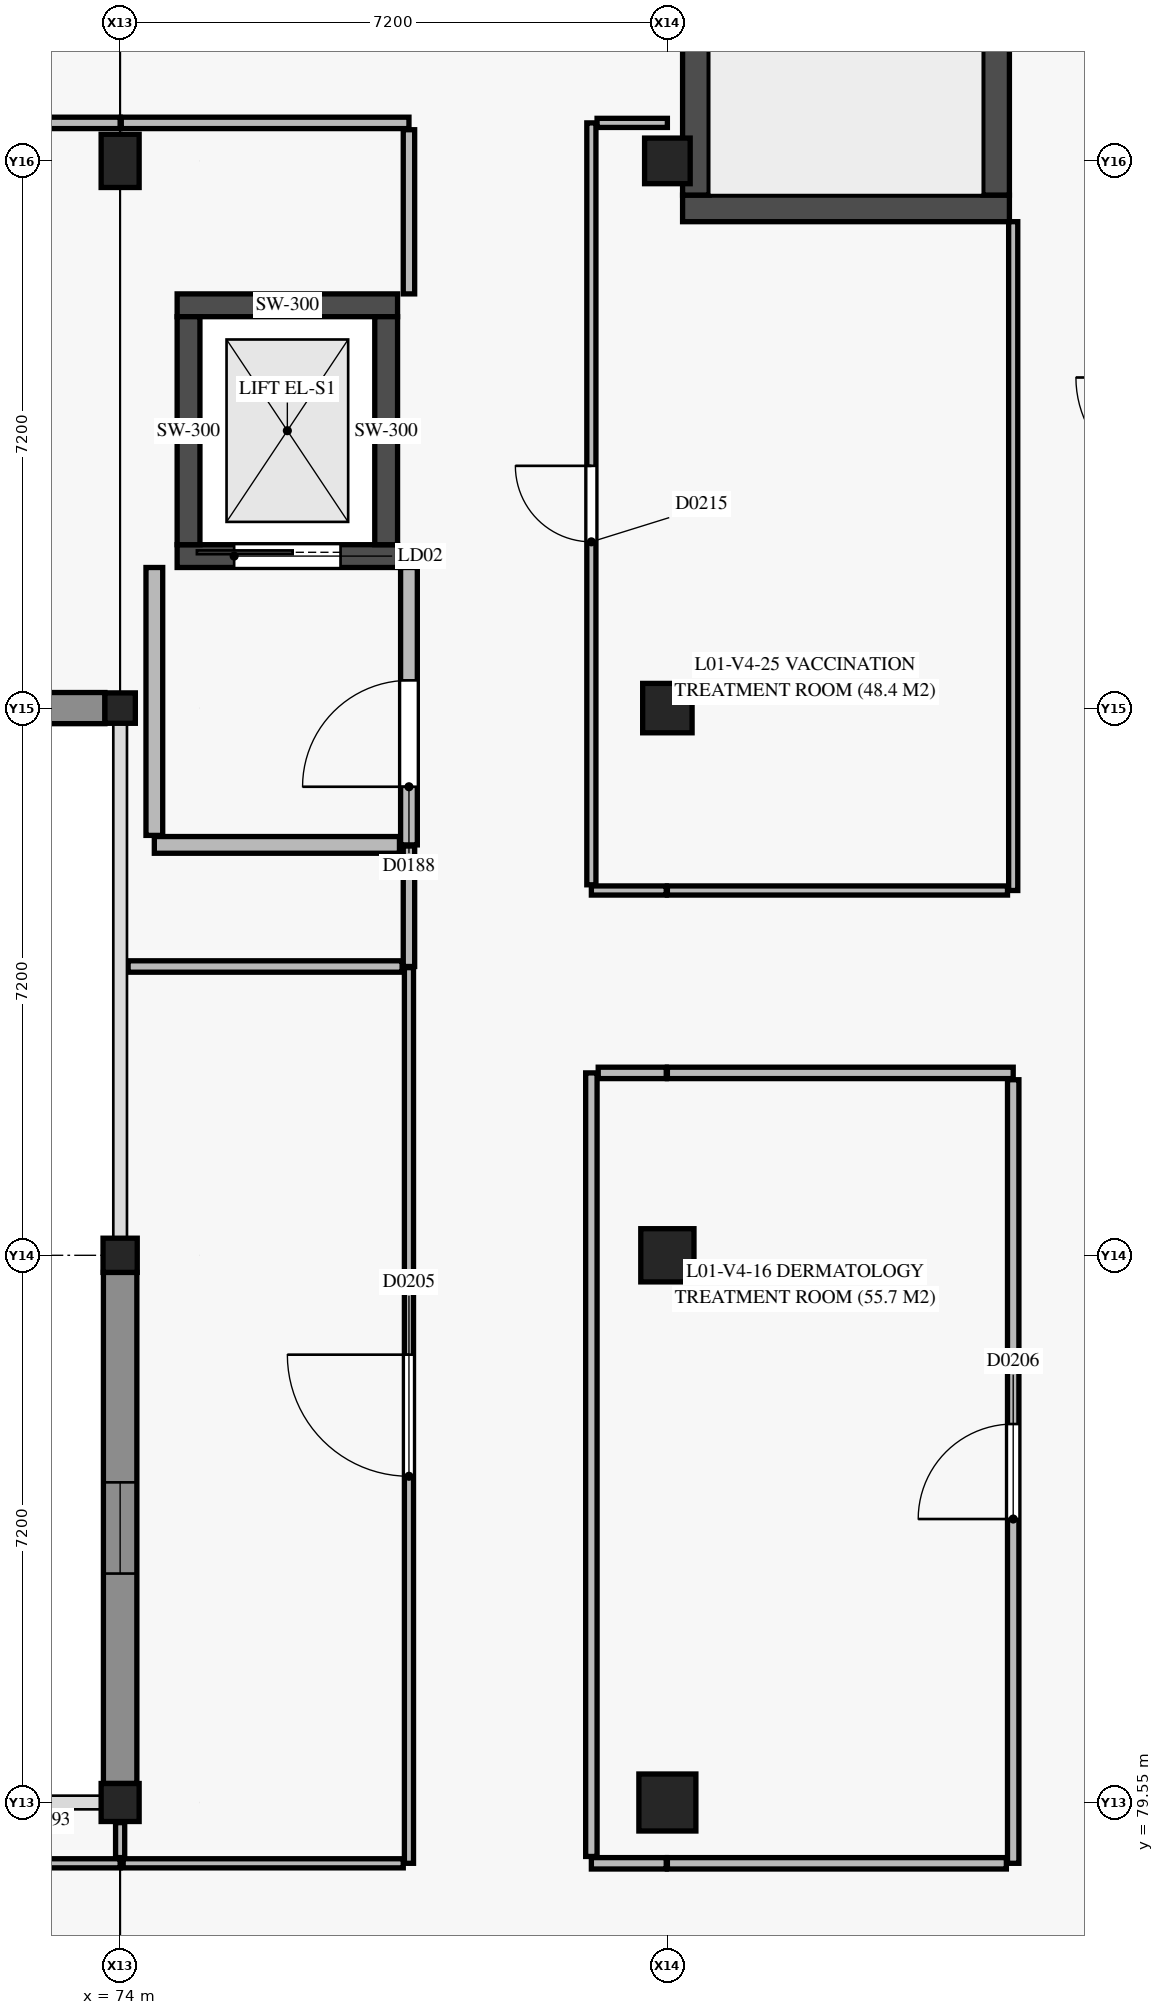
"""IFC4 building model, lengths in metres.
Left out: names, types, materials, properties, quantities, classifications, styles, units other than length and angle.
Written with IfcOpenShell. Run it as: python <this file> out.ifc"""

import sys

from ifc_helpers import new_model, si_unit, direction, frame, frame_2d, origin, origin_2d, place, context, subcontext, project, spatial, rectangle, extrude, element, fill, save


model = new_model("IFC4")
c1 = context("Model", 3, precision=1e-05, world=origin(), true_north=direction((0.0, 1.0)))
c2 = subcontext(c1, "Body", "Model", "MODEL_VIEW")
j1 = project(units=[si_unit("LENGTHUNIT", "METRE"), si_unit("PLANEANGLEUNIT", "RADIAN")], contexts=[c1])
p1 = place(None, origin())
s1 = spatial("IfcSite", under=j1, at=p1, CompositionType="ELEMENT")
p2 = place(p1, origin())
s2 = spatial("IfcBuilding", under=s1, at=p2, CompositionType="ELEMENT")
p3 = place(p2, frame((0.0, 0.0, 4.8)))
s3 = spatial("IfcBuildingStorey", under=s2, at=p3, CompositionType="ELEMENT", Elevation=4.8)
p4 = place(p3, frame((74.0, 79.55, 0.0), z_axis=(0.0, 0.0, 1.0), x_axis=(1.0, 0.0, 0.0)))
e1 = element("IfcColumn", 1, at=p4, inside=s3, PredefinedType="COLUMN", context=c2, shape_type="SweptSolid", body=[
    extrude(rectangle(XDim=0.5, YDim=0.5, at=origin_2d()), origin(), (0.0, 0.0, 1.0), 4.2),
])
p5 = place(p3, frame((74.0, 86.75, 0.0), z_axis=(0.0, 0.0, 1.0), x_axis=(1.0, 0.0, 0.0)))
e2 = element("IfcColumn", 2, at=p5, inside=s3, PredefinedType="COLUMN", context=c2, shape_type="SweptSolid", body=[
    extrude(rectangle(XDim=0.45, YDim=0.45, at=origin_2d()), origin(), (0.0, 0.0, 1.0), 4.2),
])
p6 = place(p3, frame((74.0, 93.95, 0.0), z_axis=(0.0, 0.0, 1.0), x_axis=(1.0, 0.0, 0.0)))
e3 = element("IfcColumn", 3, at=p6, inside=s3, PredefinedType="COLUMN", context=c2, shape_type="SweptSolid", body=[
    extrude(rectangle(XDim=0.4, YDim=0.4, at=origin_2d()), origin(), (0.0, 0.0, 1.0), 4.2),
])
p7 = place(p3, frame((74.0, 101.15, 0.0), z_axis=(0.0, 0.0, 1.0), x_axis=(1.0, 0.0, 0.0)))
e4 = element("IfcColumn", 4, at=p7, inside=s3, PredefinedType="COLUMN", context=c2, shape_type="SweptSolid", body=[
    extrude(rectangle(XDim=0.5, YDim=0.7, at=origin_2d()), origin(), (0.0, 0.0, 1.0), 4.2),
])
p8 = place(p3, frame((81.2, 79.55, 0.0), z_axis=(0.0, 0.0, 1.0), x_axis=(1.0, 0.0, 0.0)))
e5 = element("IfcColumn", 5, at=p8, inside=s3, PredefinedType="COLUMN", context=c2, shape_type="SweptSolid", body=[
    extrude(rectangle(XDim=0.75, YDim=0.75, at=origin_2d()), origin(), (0.0, 0.0, 1.0), 4.2),
])
p9 = place(p3, frame((81.2, 86.75, 0.0), z_axis=(0.0, 0.0, 1.0), x_axis=(1.0, 0.0, 0.0)))
e6 = element("IfcColumn", 6, at=p9, inside=s3, PredefinedType="COLUMN", context=c2, shape_type="SweptSolid", body=[
    extrude(rectangle(XDim=0.7, YDim=0.7, at=origin_2d()), origin(), (0.0, 0.0, 1.0), 4.2),
])
p10 = place(p3, frame((81.2, 93.95, 0.0), z_axis=(0.0, 0.0, 1.0), x_axis=(1.0, 0.0, 0.0)))
e7 = element("IfcColumn", 7, at=p10, inside=s3, PredefinedType="COLUMN", context=c2, shape_type="SweptSolid", body=[
    extrude(rectangle(XDim=0.65, YDim=0.65, at=origin_2d()), origin(), (0.0, 0.0, 1.0), 4.2),
])
p11 = place(p3, frame((81.2, 101.15, 0.0), z_axis=(0.0, 0.0, 1.0), x_axis=(1.0, 0.0, 0.0)))
e8 = element("IfcColumn", 8, at=p11, inside=s3, PredefinedType="COLUMN", context=c2, shape_type="SweptSolid", body=[
    extrude(rectangle(XDim=0.6, YDim=0.6, at=origin_2d()), origin(), (0.0, 0.0, 1.0), 4.2),
])
p12 = place(p3, frame((81.4, 100.525, 0.0), z_axis=(0.0, 0.0, 1.0), x_axis=(1.0, 0.0, 0.0)))
e9 = element("IfcWall", 9, at=p12, inside=s3, PredefinedType="SHEAR", context=c2, shape_type="SweptSolid", body=[
    extrude(rectangle(XDim=4.3, YDim=0.35, at=frame_2d((2.15, 0.0))), origin(), (0.0, 0.0, 1.0), 3.95),
])
p13 = place(p3, frame((81.575, 100.7, 0.0), z_axis=(0.0, 0.0, 1.0), x_axis=(0.0, 1.0, 0.0)))
e10 = element("IfcWall", 10, at=p13, inside=s3, PredefinedType="SHEAR", context=c2, shape_type="SweptSolid", body=[
    extrude(rectangle(XDim=7.3, YDim=0.35, at=frame_2d((3.65, 0.0))), origin(), (0.0, 0.0, 1.0), 3.95),
])
p14 = place(p3, frame((85.525, 100.7, 0.0), z_axis=(0.0, 0.0, 1.0), x_axis=(0.0, 1.0, 0.0)))
e11 = element("IfcWall", 11, at=p14, inside=s3, PredefinedType="SHEAR", context=c2, shape_type="SweptSolid", body=[
    extrude(rectangle(XDim=7.3, YDim=0.35, at=frame_2d((3.65, 0.0))), origin(), (0.0, 0.0, 1.0), 3.95),
])
p15 = place(p14, frame((5.68, 0.0, 0.0)))
e12 = element("IfcOpeningElement", 12, at=p15, cuts=e11, PredefinedType="OPENING", context=c2, shape_type="SweptSolid", body=[
    extrude(rectangle(XDim=1.5, YDim=2.15, at=frame_2d((0.75, 1.075))), frame((0.0, 0.185, 0.0), z_axis=(0.0, -1.0, 0.0), x_axis=(1.0, 0.0, 0.0)), (0.0, 0.0, 1.0), 0.37),
])
p16 = place(p3, frame((74.75, 95.95, 0.0), z_axis=(0.0, 0.0, 1.0), x_axis=(1.0, 0.0, 0.0)))
e13 = element("IfcWall", 13, at=p16, inside=s3, PredefinedType="SHEAR", context=c2, shape_type="SweptSolid", body=[
    extrude(rectangle(XDim=2.9, YDim=0.3, at=frame_2d((1.45, 0.0))), origin(), (0.0, 0.0, 1.0), 3.95),
])
p17 = place(p16, frame((0.75, 0.0, 0.0)))
e14 = element("IfcOpeningElement", 14, at=p17, cuts=e13, PredefinedType="OPENING", context=c2, shape_type="SweptSolid", body=[
    extrude(rectangle(XDim=1.4, YDim=2.15, at=frame_2d((0.7, 1.075))), frame((0.0, 0.16, 0.0), z_axis=(0.0, -1.0, 0.0), x_axis=(1.0, 0.0, 0.0)), (0.0, 0.0, 1.0), 0.32),
])
p18 = place(p3, frame((74.75, 99.25, 0.0), z_axis=(0.0, 0.0, 1.0), x_axis=(1.0, 0.0, 0.0)))
e15 = element("IfcWall", 15, at=p18, inside=s3, PredefinedType="SHEAR", context=c2, shape_type="SweptSolid", body=[
    extrude(rectangle(XDim=2.9, YDim=0.3, at=frame_2d((1.45, 0.0))), origin(), (0.0, 0.0, 1.0), 3.95),
])
for number, where, z_axis, x_axis in (
    (16, (74.9, 96.1, 0.0), (0.0, 0.0, 1.0), (0.0, 1.0, 0.0)),
    (17, (77.5, 96.1, 0.0), (0.0, 0.0, 1.0), (0.0, 1.0, 0.0)),
):
    element("IfcWall", number, at=place(p3, frame(where, z_axis=z_axis, x_axis=x_axis)), inside=s3, PredefinedType="SHEAR", context=c2, shape_type="SweptSolid", body=[
        extrude(rectangle(XDim=3.0, YDim=0.3, at=frame_2d((1.5, 0.0))), origin(), (0.0, 0.0, 1.0), 3.95),
    ])
p19 = place(p3, frame((74.0, 79.8, 0.0), z_axis=(0.0, 0.0, 1.0), x_axis=(0.0, 1.0, 0.0)))
e18 = element("IfcWall", 18, at=p19, inside=s3, PredefinedType="USERDEFINED", context=c2, shape_type="SweptSolid", body=[
    extrude(rectangle(XDim=6.725, YDim=0.44, at=frame_2d((3.362, 0.0))), origin(), (0.0, 0.0, 1.0), 3.13),
])
p20 = place(p19, frame((2.762, 0.0, 0.9)))
e19 = element("IfcOpeningElement", 19, at=p20, cuts=e18, PredefinedType="OPENING", context=c2, shape_type="SweptSolid", body=[
    extrude(rectangle(XDim=1.2, YDim=1.5, at=frame_2d((0.6, 0.75))), frame((0.0, 0.23, 0.0), z_axis=(0.0, -1.0, 0.0), x_axis=(1.0, 0.0, 0.0)), (0.0, 0.0, 1.0), 0.46),
])
p21 = place(p3, frame((73.8, 93.95, 0.0), z_axis=(0.0, 0.0, 1.0), x_axis=(-1.0, 0.0, 0.0)))
e20 = element("IfcWall", 20, at=p21, inside=s3, PredefinedType="USERDEFINED", context=c2, shape_type="SweptSolid", body=[
    extrude(rectangle(XDim=6.625, YDim=0.41, at=frame_2d((3.312, 0.0))), origin(), (0.0, 0.0, 1.0), 3.13),
])
p22 = place(p21, frame((0.84, 0.0, 0.6)))
e21 = element("IfcOpeningElement", 21, at=p22, cuts=e20, PredefinedType="OPENING", context=c2, shape_type="SweptSolid", body=[
    extrude(rectangle(XDim=1.2, YDim=2.2, at=frame_2d((0.6, 1.1))), frame((0.0, 0.215, 0.0), z_axis=(0.0, -1.0, 0.0), x_axis=(1.0, 0.0, 0.0)), (0.0, 0.0, 1.0), 0.43),
])
p23 = place(p21, frame((3.972, 0.0, 0.6)))
e22 = element("IfcOpeningElement", 22, at=p23, cuts=e20, PredefinedType="OPENING", context=c2, shape_type="SweptSolid", body=[
    extrude(rectangle(XDim=1.6, YDim=2.2, at=frame_2d((0.8, 1.1))), frame((0.0, 0.215, 0.0), z_axis=(0.0, -1.0, 0.0), x_axis=(1.0, 0.0, 0.0)), (0.0, 0.0, 1.0), 0.43),
])
p24 = place(p3, frame((77.8, 92.15, 0.0), z_axis=(0.0, 0.0, 1.0), x_axis=(0.0, 1.0, 0.0)))
e23 = element("IfcWall", 23, at=p24, inside=s3, PredefinedType="PARTITIONING", context=c2, shape_type="SweptSolid", body=[
    extrude(rectangle(XDim=3.65, YDim=0.22, at=frame_2d((1.825, 0.0))), origin(), (0.0, 0.0, 1.0), 3.285),
])
p25 = place(p24, frame((0.765, 0.0, 0.0)))
e24 = element("IfcOpeningElement", 24, at=p25, cuts=e23, PredefinedType="OPENING", context=c2, shape_type="SweptSolid", body=[
    extrude(rectangle(XDim=1.4, YDim=2.2, at=frame_2d((0.7, 1.1))), frame((0.0, 0.12, 0.0), z_axis=(0.0, -1.0, 0.0), x_axis=(1.0, 0.0, 0.0)), (0.0, 0.0, 1.0), 0.24),
])
p26 = place(p3, frame((74.45, 92.15, 0.0), z_axis=(0.0, 0.0, 1.0), x_axis=(1.0, 0.0, 0.0)))
e25 = element("IfcWall", 25, at=p26, inside=s3, PredefinedType="PARTITIONING", context=c2, shape_type="SweptSolid", body=[
    extrude(rectangle(XDim=3.225, YDim=0.22, at=frame_2d((1.613, 0.0))), origin(), (0.0, 0.0, 1.0), 3.95),
])
p27 = place(p3, frame((74.45, 92.275, 0.0), z_axis=(0.0, 0.0, 1.0), x_axis=(0.0, 1.0, 0.0)))
e26 = element("IfcWall", 26, at=p27, inside=s3, PredefinedType="PARTITIONING", context=c2, shape_type="SweptSolid", body=[
    extrude(rectangle(XDim=3.525, YDim=0.22, at=frame_2d((1.763, 0.0))), origin(), (0.0, 0.0, 1.0), 3.285),
])
p28 = place(p3, frame((81.2, 89.15, 0.0), z_axis=(0.0, 0.0, 1.0), x_axis=(1.0, 0.0, 0.0)))
e27 = element("IfcWall", 27, at=p28, inside=s3, PredefinedType="PARTITIONING", context=c2, shape_type="SweptSolid", body=[
    extrude(rectangle(XDim=4.55, YDim=0.15, at=frame_2d((2.275, 0.0))), origin(), (0.0, 0.0, 1.0), 3.415),
])
p29 = place(p3, frame((85.75, 78.75, 0.0), z_axis=(0.0, 0.0, 1.0), x_axis=(0.0, 1.0, 0.0)))
e28 = element("IfcWall", 28, at=p29, inside=s3, PredefinedType="PARTITIONING", context=c2, shape_type="SweptSolid", body=[
    extrude(rectangle(XDim=10.31, YDim=0.15, at=frame_2d((5.155, 0.0))), origin(), (0.0, 0.0, 1.0), 3.285),
])
p30 = place(p29, frame((4.53, 0.0, 0.0)))
e29 = element("IfcOpeningElement", 29, at=p30, cuts=e28, PredefinedType="OPENING", context=c2, shape_type="SweptSolid", body=[
    extrude(rectangle(XDim=1.25, YDim=2.15, at=frame_2d((0.625, 1.075))), frame((0.0, 0.085, 0.0), z_axis=(0.0, -1.0, 0.0), x_axis=(1.0, 0.0, 0.0)), (0.0, 0.0, 1.0), 0.17),
])
p31 = place(p3, frame((81.2, 78.75, 0.0), z_axis=(0.0, 0.0, 1.0), x_axis=(1.0, 0.0, 0.0)))
e30 = element("IfcWall", 30, at=p31, inside=s3, PredefinedType="PARTITIONING", context=c2, shape_type="SweptSolid", body=[
    extrude(rectangle(XDim=4.46, YDim=0.15, at=frame_2d((2.23, 0.0))), origin(), (0.0, 0.0, 1.0), 3.285),
])
p32 = place(p3, frame((80.2, 78.75, 0.0), z_axis=(0.0, 0.0, 1.0), x_axis=(1.0, 0.0, 0.0)))
e31 = element("IfcWall", 31, at=p32, inside=s3, PredefinedType="PARTITIONING", context=c2, shape_type="SweptSolid", body=[
    extrude(rectangle(XDim=0.985, YDim=0.15, at=frame_2d((0.493, 0.0))), origin(), (0.0, 0.0, 1.0), 3.285),
])
p33 = place(p3, frame((80.2, 78.84, 0.0), z_axis=(0.0, 0.0, 1.0), x_axis=(0.0, 1.0, 0.0)))
e32 = element("IfcWall", 32, at=p33, inside=s3, PredefinedType="PARTITIONING", context=c2, shape_type="SweptSolid", body=[
    extrude(rectangle(XDim=10.31, YDim=0.15, at=frame_2d((5.155, 0.0))), origin(), (0.0, 0.0, 1.0), 2.375),
])
p34 = place(p3, frame((80.29, 89.15, 0.0), z_axis=(0.0, 0.0, 1.0), x_axis=(1.0, 0.0, 0.0)))
e33 = element("IfcWall", 33, at=p34, inside=s3, PredefinedType="PARTITIONING", context=c2, shape_type="SweptSolid", body=[
    extrude(rectangle(XDim=0.895, YDim=0.15, at=frame_2d((0.448, 0.0))), origin(), (0.0, 0.0, 1.0), 3.415),
])
p35 = place(p3, frame((70.915, 101.65, 0.0), z_axis=(0.0, 0.0, 1.0), x_axis=(1.0, 0.0, 0.0)))
e34 = element("IfcWall", 34, at=p35, inside=s3, PredefinedType="PARTITIONING", context=c2, shape_type="SweptSolid", body=[
    extrude(rectangle(XDim=3.085, YDim=0.15, at=frame_2d((1.542, 0.0))), origin(), (0.0, 0.0, 1.0), 3.355),
])
p36 = place(p3, frame((74.015, 101.65, 0.0), z_axis=(0.0, 0.0, 1.0), x_axis=(1.0, 0.0, 0.0)))
e35 = element("IfcWall", 35, at=p36, inside=s3, PredefinedType="PARTITIONING", context=c2, shape_type="SweptSolid", body=[
    extrude(rectangle(XDim=3.785, YDim=0.15, at=frame_2d((1.893, 0.0))), origin(), (0.0, 0.0, 1.0), 3.355),
])
p37 = place(p3, frame((77.8, 99.4, 0.0), z_axis=(0.0, 0.0, 1.0), x_axis=(0.0, 1.0, 0.0)))
e36 = element("IfcWall", 36, at=p37, inside=s3, PredefinedType="PARTITIONING", context=c2, shape_type="SweptSolid", body=[
    extrude(rectangle(XDim=2.16, YDim=0.15, at=frame_2d((1.08, 0.0))), origin(), (0.0, 0.0, 1.0), 3.215),
])
p38 = place(p3, frame((77.8, 90.55, 0.0), z_axis=(0.0, 0.0, 1.0), x_axis=(0.0, 1.0, 0.0)))
e37 = element("IfcWall", 37, at=p38, inside=s3, PredefinedType="PARTITIONING", context=c2, shape_type="SweptSolid", body=[
    extrude(rectangle(XDim=1.585, YDim=0.15, at=frame_2d((0.792, 0.0))), origin(), (0.0, 0.0, 1.0), 3.475),
])
p39 = place(p3, frame((73.0, 78.75, 0.0), z_axis=(0.0, 0.0, 1.0), x_axis=(1.0, 0.0, 0.0)))
e38 = element("IfcWall", 38, at=p39, inside=s3, PredefinedType="PARTITIONING", context=c2, shape_type="SweptSolid", body=[
    extrude(rectangle(XDim=1.0, YDim=0.12, at=frame_2d((0.5, 0.0))), origin(), (0.0, 0.0, 1.0), 3.385),
])
p40 = place(p3, frame((77.8, 78.75, 0.0), z_axis=(0.0, 0.0, 1.0), x_axis=(0.0, 1.0, 0.0)))
e39 = element("IfcWall", 39, at=p40, inside=s3, PredefinedType="PARTITIONING", context=c2, shape_type="SweptSolid", body=[
    extrude(rectangle(XDim=11.785, YDim=0.12, at=frame_2d((5.893, 0.0))), origin(), (0.0, 0.0, 1.0), 2.375),
])
p41 = place(p40, frame((5.093, 0.0, 0.0)))
e40 = element("IfcOpeningElement", 40, at=p41, cuts=e39, PredefinedType="OPENING", context=c2, shape_type="SweptSolid", body=[
    extrude(rectangle(XDim=1.6, YDim=2.25, at=frame_2d((0.8, 1.125))), frame((0.0, 0.07, 0.0), z_axis=(0.0, -1.0, 0.0), x_axis=(1.0, 0.0, 0.0)), (0.0, 0.0, 1.0), 0.14),
])
p42 = place(p3, frame((74.04, 78.75, 0.0), z_axis=(0.0, 0.0, 1.0), x_axis=(1.0, 0.0, 0.0)))
e41 = element("IfcWall", 41, at=p42, inside=s3, PredefinedType="PARTITIONING", context=c2, shape_type="SweptSolid", body=[
    extrude(rectangle(XDim=3.685, YDim=0.12, at=frame_2d((1.843, 0.0))), origin(), (0.0, 0.0, 1.0), 3.385),
])
p43 = place(p3, frame((85.75, 91.55, 0.0), z_axis=(0.0, 0.0, 1.0), x_axis=(0.0, 1.0, 0.0)))
e42 = element("IfcWall", 42, at=p43, inside=s3, PredefinedType="PARTITIONING", context=c2, shape_type="SweptSolid", body=[
    extrude(rectangle(XDim=8.8, YDim=0.12, at=frame_2d((4.4, 0.0))), origin(), (0.0, 0.0, 1.0), 3.285),
])
p44 = place(p3, frame((81.2, 91.55, 0.0), z_axis=(0.0, 0.0, 1.0), x_axis=(1.0, 0.0, 0.0)))
e43 = element("IfcWall", 43, at=p44, inside=s3, PredefinedType="PARTITIONING", context=c2, shape_type="SweptSolid", body=[
    extrude(rectangle(XDim=4.475, YDim=0.12, at=frame_2d((2.238, 0.0))), origin(), (0.0, 0.0, 1.0), 3.415),
])
p45 = place(p3, frame((80.2, 91.55, 0.0), z_axis=(0.0, 0.0, 1.0), x_axis=(1.0, 0.0, 0.0)))
e44 = element("IfcWall", 44, at=p45, inside=s3, PredefinedType="PARTITIONING", context=c2, shape_type="SweptSolid", body=[
    extrude(rectangle(XDim=0.985, YDim=0.12, at=frame_2d((0.493, 0.0))), origin(), (0.0, 0.0, 1.0), 3.415),
])
p46 = place(p3, frame((80.2, 91.625, 0.0), z_axis=(0.0, 0.0, 1.0), x_axis=(0.0, 1.0, 0.0)))
e45 = element("IfcWall", 45, at=p46, inside=s3, PredefinedType="PARTITIONING", context=c2, shape_type="SweptSolid", body=[
    extrude(rectangle(XDim=10.025, YDim=0.12, at=frame_2d((5.012, 0.0))), origin(), (0.0, 0.0, 1.0), 3.215),
])
p47 = place(p46, frame((4.512, 0.0, 0.0)))
e46 = element("IfcOpeningElement", 46, at=p47, cuts=e45, PredefinedType="OPENING", context=c2, shape_type="SweptSolid", body=[
    extrude(rectangle(XDim=1.0, YDim=2.15, at=frame_2d((0.5, 1.075))), frame((0.0, 0.07, 0.0), z_axis=(0.0, -1.0, 0.0), x_axis=(1.0, 0.0, 0.0)), (0.0, 0.0, 1.0), 0.14),
])
p48 = place(p3, frame((80.275, 101.65, 0.0), z_axis=(0.0, 0.0, 1.0), x_axis=(1.0, 0.0, 0.0)))
e47 = element("IfcWall", 47, at=p48, inside=s3, PredefinedType="PARTITIONING", context=c2, shape_type="SweptSolid", body=[
    extrude(rectangle(XDim=0.925, YDim=0.12, at=frame_2d((0.462, 0.0))), origin(), (0.0, 0.0, 1.0), 3.215),
])
p49 = place(p3, frame((74.105, 90.55, 0.0), z_axis=(0.0, 0.0, 1.0), x_axis=(1.0, 0.0, 0.0)))
e48 = element("IfcWall", 48, at=p49, inside=s3, PredefinedType="PARTITIONING", context=c2, shape_type="SweptSolid", body=[
    extrude(rectangle(XDim=3.605, YDim=0.15, at=frame_2d((1.802, 0.0))), origin(), (0.0, 0.0, 1.0), 3.235),
])
p50 = place(p3, frame((74.0, 78.825, 0.0), z_axis=(0.0, 0.0, 1.0), x_axis=(0.0, 1.0, 0.0)))
e49 = element("IfcWall", 49, at=p50, inside=s3, PredefinedType="PARTITIONING", context=c2, shape_type="SweptSolid", body=[
    extrude(rectangle(XDim=0.46, YDim=0.12, at=frame_2d((0.23, 0.0))), origin(), (0.0, 0.0, 1.0), 3.385),
])
p51 = place(p20, origin())
e50 = element("IfcWindow", 50, at=p51, inside=s3, PartitioningType="SINGLE_PANEL", PredefinedType="WINDOW", context=c2, shape_type="SweptSolid", body=[
    extrude(rectangle(XDim=1.2, YDim=1.5, at=frame_2d((0.6, 0.75))), frame((0.0, 0.03, 0.0), z_axis=(0.0, -1.0, 0.0), x_axis=(1.0, 0.0, 0.0)), (0.0, 0.0, 1.0), 0.06),
])
fill(e19, e50)
p52 = place(p17, origin())
e51 = element("IfcDoor", 51, at=p52, inside=s3, OperationType="SLIDING_TO_LEFT", PredefinedType="DOOR", context=c2, shape_type="SweptSolid", body=[
    extrude(rectangle(XDim=1.4, YDim=2.15, at=frame_2d((0.7, 1.075))), frame((0.0, 0.025, 0.0), z_axis=(0.0, -1.0, 0.0), x_axis=(1.0, 0.0, 0.0)), (0.0, 0.0, 1.0), 0.05),
])
fill(e14, e51)
p53 = place(p25, origin())
e52 = element("IfcDoor", 52, at=p53, inside=s3, OperationType="SINGLE_SWING_LEFT", PredefinedType="DOOR", context=c2, shape_type="SweptSolid", body=[
    extrude(rectangle(XDim=1.4, YDim=2.2, at=frame_2d((0.7, 1.1))), frame((0.0, 0.025, 0.0), z_axis=(0.0, -1.0, 0.0), x_axis=(1.0, 0.0, 0.0)), (0.0, 0.0, 1.0), 0.05),
])
fill(e24, e52)
p54 = place(p41, origin())
e53 = element("IfcDoor", 53, at=p54, inside=s3, OperationType="SINGLE_SWING_RIGHT", PredefinedType="DOOR", context=c2, shape_type="SweptSolid", body=[
    extrude(rectangle(XDim=1.6, YDim=2.25, at=frame_2d((0.8, 1.125))), frame((0.0, 0.025, 0.0), z_axis=(0.0, -1.0, 0.0), x_axis=(1.0, 0.0, 0.0)), (0.0, 0.0, 1.0), 0.05),
])
fill(e40, e53)
p55 = place(p30, origin())
e54 = element("IfcDoor", 54, at=p55, inside=s3, OperationType="SINGLE_SWING_LEFT", PredefinedType="DOOR", context=c2, shape_type="SweptSolid", body=[
    extrude(rectangle(XDim=1.25, YDim=2.15, at=frame_2d((0.625, 1.075))), frame((0.0, 0.025, 0.0), z_axis=(0.0, -1.0, 0.0), x_axis=(1.0, 0.0, 0.0)), (0.0, 0.0, 1.0), 0.05),
])
fill(e29, e54)
p56 = place(p47, origin())
e55 = element("IfcDoor", 55, at=p56, inside=s3, OperationType="SINGLE_SWING_RIGHT", PredefinedType="DOOR", context=c2, shape_type="SweptSolid", body=[
    extrude(rectangle(XDim=1.0, YDim=2.15, at=frame_2d((0.5, 1.075))), frame((0.0, 0.025, 0.0), z_axis=(0.0, -1.0, 0.0), x_axis=(1.0, 0.0, 0.0)), (0.0, 0.0, 1.0), 0.05),
])
fill(e46, e55)
save(model, sys.argv[1])
